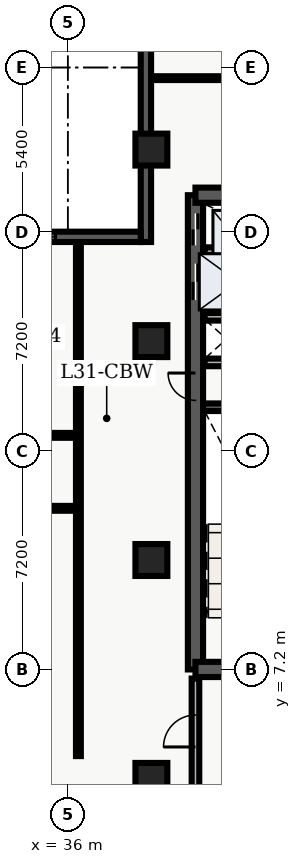
"""IFC4 building model, lengths in metres.
Left out: names, types, materials, properties, quantities, classifications, styles, units other than length and angle.
Written with IfcOpenShell. Run it as: python <this file> out.ifc"""

import sys

from ifc_helpers import new_model, entity, si_unit, converted_unit, direction, frame, origin_with_axes, origin_2d_with_axis, place, context, subcontext, project, spatial, polyline, rectangle, outline, extrude, element, fill, save


model = new_model("IFC4")
c1 = context("Model", 3, precision=1e-05, world=origin_with_axes(), true_north=direction((0.0, 1.0)))
c2 = subcontext(c1, "Body", "Model", "MODEL_VIEW")
j1 = project(units=[si_unit("LENGTHUNIT", "METRE"), converted_unit("PLANEANGLEUNIT", "DEGREE", entity("IfcPlaneAngleMeasure", 0.017), si_unit("PLANEANGLEUNIT", "RADIAN"), dimensions=[0, 0, 0, 0, 0, 0, 0])], contexts=[c1])
p1 = place(None, origin_with_axes())
s1 = spatial("IfcSite", under=j1, at=p1, CompositionType="ELEMENT")
p2 = place(p1, origin_with_axes())
s2 = spatial("IfcBuilding", under=s1, at=p2, CompositionType="ELEMENT")
p3 = place(p2, frame((0.0, 0.0, 129.0), z_axis=(0.0, 0.0, 1.0), x_axis=(1.0, 0.0, 0.0)))
s3 = spatial("IfcBuildingStorey", under=s2, at=p3, CompositionType="ELEMENT", Elevation=129.0)
p4 = place(p3, frame((40.2, 7.2, 0.0), z_axis=(0.0, 0.0, 1.0), x_axis=(0.0, 1.0, 0.0)))
e1 = element("IfcWall", 1, at=p4, inside=s3, PredefinedType="SHEAR", context=c2, shape_type="SweptSolid", body=[
    extrude(outline(polyline([(0.0, -0.25), (15.6, -0.25), (15.6, 0.25), (0.0, 0.25), (0.0, -0.25)])), origin_with_axes(), (0.0, 0.0, 1.0), 3.66),
])
p5 = place(p4, frame((14.475, 0.0, 0.0), z_axis=(0.0, 0.0, 1.0), x_axis=(1.0, 0.0, 0.0)))
e2 = element("IfcOpeningElement", 2, at=p5, cuts=e1, PredefinedType="OPENING", context=c2, shape_type="SweptSolid", body=[
    extrude(rectangle(XDim=1.05, YDim=0.52, at=origin_2d_with_axis()), origin_with_axes(), (0.0, 0.0, 1.0), 2.15),
])
p6 = place(p4, frame((12.75, 0.0, 0.0), z_axis=(0.0, 0.0, 1.0), x_axis=(1.0, 0.0, 0.0)))
e3 = element("IfcOpeningElement", 3, at=p6, cuts=e1, PredefinedType="OPENING", context=c2, shape_type="SweptSolid", body=[
    extrude(rectangle(XDim=1.2, YDim=0.52, at=origin_2d_with_axis()), origin_with_axes(), (0.0, 0.0, 1.0), 2.15),
])
p7 = place(p4, frame((9.3, 0.0, 0.0), z_axis=(0.0, 0.0, 1.0), x_axis=(1.0, 0.0, 0.0)))
e4 = element("IfcOpeningElement", 4, at=p7, cuts=e1, PredefinedType="OPENING", context=c2, shape_type="SweptSolid", body=[
    extrude(rectangle(XDim=0.9, YDim=0.52, at=origin_2d_with_axis()), origin_with_axes(), (0.0, 0.0, 1.0), 2.15),
])
p8 = place(p3, frame((40.2, 7.2, 0.0), z_axis=(0.0, 0.0, 1.0), x_axis=(1.0, 0.0, 0.0)))
e5 = element("IfcWall", 5, at=p8, inside=s3, PredefinedType="SHEAR", context=c2, shape_type="SweptSolid", body=[
    extrude(outline(polyline([(0.0, -0.25), (7.85, -0.25), (7.85, 0.25), (0.0, 0.25), (0.0, -0.25)])), origin_with_axes(), (0.0, 0.0, 1.0), 3.66),
])
p9 = place(p8, frame((2.175, 0.0, 0.0), z_axis=(0.0, 0.0, 1.0), x_axis=(1.0, 0.0, 0.0)))
e6 = element("IfcOpeningElement", 6, at=p9, cuts=e5, PredefinedType="OPENING", context=c2, shape_type="SweptSolid", body=[
    extrude(rectangle(XDim=1.05, YDim=0.52, at=origin_2d_with_axis()), origin_with_axes(), (0.0, 0.0, 1.0), 2.15),
])
p10 = place(p3, frame((40.2, 22.8, 0.0), z_axis=(0.0, 0.0, 1.0), x_axis=(1.0, 0.0, 0.0)))
e7 = element("IfcWall", 7, at=p10, inside=s3, PredefinedType="SHEAR", context=c2, shape_type="SweptSolid", body=[
    extrude(outline(polyline([(0.0, -0.25), (7.85, -0.25), (7.85, 0.25), (0.0, 0.25), (0.0, -0.25)])), origin_with_axes(), (0.0, 0.0, 1.0), 3.66),
])
p11 = place(p10, frame((5.775, 0.0, 0.0), z_axis=(0.0, 0.0, 1.0), x_axis=(1.0, 0.0, 0.0)))
e8 = element("IfcOpeningElement", 8, at=p11, cuts=e7, PredefinedType="OPENING", context=c2, shape_type="SweptSolid", body=[
    extrude(rectangle(XDim=1.05, YDim=0.52, at=origin_2d_with_axis()), origin_with_axes(), (0.0, 0.0, 1.0), 2.15),
])
p12 = place(p3, frame((40.45, 15.825, 0.0), z_axis=(0.0, 0.0, 1.0), x_axis=(1.0, 0.0, 0.0)))
e9 = element("IfcWall", 9, at=p12, inside=s3, PredefinedType="SHEAR", context=c2, shape_type="SweptSolid", body=[
    extrude(outline(polyline([(0.0, -0.125), (3.55, -0.125), (3.55, 0.125), (0.0, 0.125), (0.0, -0.125)])), origin_with_axes(), (0.0, 0.0, 1.0), 3.66),
])
p13 = place(p3, frame((40.5, 17.3, 0.0), z_axis=(0.0, 0.0, 1.0), x_axis=(1.0, 0.0, 0.0)))
e10 = element("IfcWall", 10, at=p13, inside=s3, PredefinedType="SOLIDWALL", context=c2, shape_type="SweptSolid", body=[
    extrude(outline(polyline([(0.0, -0.125), (3.5, -0.125), (3.5, 0.125), (0.0, 0.125), (0.0, -0.125)])), origin_with_axes(), (0.0, 0.0, 1.0), 2.7),
])
p14 = place(p13, frame((2.4, 0.0, 0.0), z_axis=(0.0, 0.0, 1.0), x_axis=(1.0, 0.0, 0.0)))
e11 = element("IfcOpeningElement", 11, at=p14, cuts=e10, PredefinedType="OPENING", context=c2, shape_type="SweptSolid", body=[
    extrude(rectangle(XDim=0.9, YDim=0.27, at=origin_2d_with_axis()), origin_with_axes(), (0.0, 0.0, 1.0), 2.15),
])
p15 = place(p3, frame((40.5, 18.8, 0.0), z_axis=(0.0, 0.0, 1.0), x_axis=(1.0, 0.0, 0.0)))
e12 = element("IfcWall", 12, at=p15, inside=s3, PredefinedType="SOLIDWALL", context=c2, shape_type="SweptSolid", body=[
    extrude(outline(polyline([(0.0, -0.125), (3.5, -0.125), (3.5, 0.125), (0.0, 0.125), (0.0, -0.125)])), origin_with_axes(), (0.0, 0.0, 1.0), 2.7),
])
p16 = place(p3, frame((40.2, 3.1, 0.0), z_axis=(0.0, 0.0, 1.0), x_axis=(0.0, 1.0, 0.0)))
e13 = element("IfcWall", 13, at=p16, inside=s3, PredefinedType="SOLIDWALL", context=c2, shape_type="SweptSolid", body=[
    extrude(outline(polyline([(0.0, -0.125), (3.8, -0.125), (3.8, 0.125), (0.0, 0.125), (0.0, -0.125)])), origin_with_axes(), (0.0, 0.0, 1.0), 2.7),
])
p17 = place(p16, frame((2.075, 0.0, 0.0), z_axis=(0.0, 0.0, 1.0), x_axis=(1.0, 0.0, 0.0)))
e14 = element("IfcOpeningElement", 14, at=p17, cuts=e13, PredefinedType="OPENING", context=c2, shape_type="SweptSolid", body=[
    extrude(rectangle(XDim=1.05, YDim=0.27, at=origin_2d_with_axis()), origin_with_axes(), (0.0, 0.0, 1.0), 2.15),
])
for number, where, z_axis, x_axis in (
    (15, (38.75, 3.6, 0.0), (0.0, 0.0, 1.0), (1.0, 0.0, 0.0)),
    (16, (38.75, 10.8, 0.0), (0.0, 0.0, 1.0), (1.0, 0.0, 0.0)),
    (17, (38.75, 18.0, 0.0), (0.0, 0.0, 1.0), (1.0, 0.0, 0.0)),
    (18, (38.75, 24.3, 0.0), (0.0, 0.0, 1.0), (1.0, 0.0, 0.0)),
):
    element("IfcColumn", number, at=place(p3, frame(where, z_axis=z_axis, x_axis=x_axis)), inside=s3, PredefinedType="COLUMN", context=c2, shape_type="SweptSolid", body=[
        extrude(rectangle(XDim=1.05, YDim=1.05, at=origin_2d_with_axis()), origin_with_axes(), (0.0, 0.0, 1.0), 3.9),
    ])
p18 = place(p3, frame((40.5, 20.96, 0.0), z_axis=(0.0, 0.0, 1.0), x_axis=(1.0, 0.0, 0.0)))
e19 = element("IfcWall", 19, at=p18, inside=s3, PredefinedType="SOLIDWALL", context=c2, shape_type="SweptSolid", body=[
    extrude(outline(polyline([(0.0, -0.125), (3.5, -0.125), (3.5, 0.125), (0.0, 0.125), (0.0, -0.125)])), origin_with_axes(), (0.0, 0.0, 1.0), 2.7),
])
p19 = place(p3, frame((21.15, 12.5, 0.0), z_axis=(0.0, 0.0, 1.0), x_axis=(1.0, 0.0, 0.0)))
e20 = element("IfcWall", 20, at=p19, inside=s3, PredefinedType="PARTITIONING", context=c2, shape_type="SweptSolid", body=[
    extrude(outline(polyline([(0.0, -0.08), (15.2, -0.08), (15.2, 0.08), (0.0, 0.08), (0.0, -0.08)])), origin_with_axes(), (0.0, 0.0, 1.0), 2.7),
])
p20 = place(p19, frame((2.283, 0.0, 0.0), z_axis=(0.0, 0.0, 1.0), x_axis=(1.0, 0.0, 0.0)))
e21 = element("IfcOpeningElement", 21, at=p20, cuts=e20, PredefinedType="OPENING", context=c2, shape_type="SweptSolid", body=[
    extrude(rectangle(XDim=1.0, YDim=0.18, at=origin_2d_with_axis()), origin_with_axes(), (0.0, 0.0, 1.0), 2.15),
])
p21 = place(p19, frame((6.801, 0.0, 0.0), z_axis=(0.0, 0.0, 1.0), x_axis=(1.0, 0.0, 0.0)))
e22 = element("IfcOpeningElement", 22, at=p21, cuts=e20, PredefinedType="OPENING", context=c2, shape_type="SweptSolid", body=[
    extrude(rectangle(XDim=1.0, YDim=0.18, at=origin_2d_with_axis()), origin_with_axes(), (0.0, 0.0, 1.0), 2.15),
])
p22 = place(p19, frame((12.168, 0.0, 0.0), z_axis=(0.0, 0.0, 1.0), x_axis=(1.0, 0.0, 0.0)))
e23 = element("IfcOpeningElement", 23, at=p22, cuts=e20, PredefinedType="OPENING", context=c2, shape_type="SweptSolid", body=[
    extrude(rectangle(XDim=1.0, YDim=0.18, at=origin_2d_with_axis()), origin_with_axes(), (0.0, 0.0, 1.0), 2.15),
])
p23 = place(p3, frame((21.15, 14.9, 0.0), z_axis=(0.0, 0.0, 1.0), x_axis=(1.0, 0.0, 0.0)))
e24 = element("IfcWall", 24, at=p23, inside=s3, PredefinedType="PARTITIONING", context=c2, shape_type="SweptSolid", body=[
    extrude(outline(polyline([(0.0, -0.08), (15.2, -0.08), (15.2, 0.08), (0.0, 0.08), (0.0, -0.08)])), origin_with_axes(), (0.0, 0.0, 1.0), 2.7),
])
p24 = place(p23, frame((2.564, 0.0, 0.0), z_axis=(0.0, 0.0, 1.0), x_axis=(1.0, 0.0, 0.0)))
e25 = element("IfcOpeningElement", 25, at=p24, cuts=e24, PredefinedType="OPENING", context=c2, shape_type="SweptSolid", body=[
    extrude(rectangle(XDim=1.0, YDim=0.18, at=origin_2d_with_axis()), origin_with_axes(), (0.0, 0.0, 1.0), 2.15),
])
p25 = place(p23, frame((6.465, 0.0, 0.0), z_axis=(0.0, 0.0, 1.0), x_axis=(1.0, 0.0, 0.0)))
e26 = element("IfcOpeningElement", 26, at=p25, cuts=e24, PredefinedType="OPENING", context=c2, shape_type="SweptSolid", body=[
    extrude(rectangle(XDim=1.0, YDim=0.18, at=origin_2d_with_axis()), origin_with_axes(), (0.0, 0.0, 1.0), 2.15),
])
p26 = place(p23, frame((9.65, 0.0, 0.0), z_axis=(0.0, 0.0, 1.0), x_axis=(1.0, 0.0, 0.0)))
e27 = element("IfcOpeningElement", 27, at=p26, cuts=e24, PredefinedType="OPENING", context=c2, shape_type="SweptSolid", body=[
    extrude(rectangle(XDim=1.0, YDim=0.18, at=origin_2d_with_axis()), origin_with_axes(), (0.0, 0.0, 1.0), 2.15),
])
p27 = place(p23, frame((13.219, 0.0, 0.0), z_axis=(0.0, 0.0, 1.0), x_axis=(1.0, 0.0, 0.0)))
e28 = element("IfcOpeningElement", 28, at=p27, cuts=e24, PredefinedType="OPENING", context=c2, shape_type="SweptSolid", body=[
    extrude(rectangle(XDim=1.0, YDim=0.18, at=origin_2d_with_axis()), origin_with_axes(), (0.0, 0.0, 1.0), 2.15),
])
p28 = place(p3, frame((36.35, 4.35, 0.0), z_axis=(0.0, 0.0, 1.0), x_axis=(0.0, 1.0, 0.0)))
e29 = element("IfcWall", 29, at=p28, inside=s3, PredefinedType="PARTITIONING", context=c2, shape_type="SweptSolid", body=[
    extrude(outline(polyline([(0.0, -0.08), (16.95, -0.08), (16.95, 0.08), (0.0, 0.08), (0.0, -0.08)])), origin_with_axes(), (0.0, 0.0, 1.0), 2.7),
])
p29 = place(p3, frame((38.735, 26.65, 0.0), z_axis=(0.0, 0.0, 1.0), x_axis=(1.0, 0.0, 0.0)))
e30 = element("IfcWall", 30, at=p29, inside=s3, PredefinedType="PARTITIONING", context=c2, shape_type="SweptSolid", body=[
    extrude(outline(polyline([(0.0, -0.062), (20.905, -0.062), (20.905, 0.062), (0.0, 0.062), (0.0, -0.062)])), origin_with_axes(), (0.0, 0.0, 1.0), 2.7),
])
p30 = place(p29, frame((4.265, 0.0, 0.0), z_axis=(0.0, 0.0, 1.0), x_axis=(1.0, 0.0, 0.0)))
e31 = element("IfcOpeningElement", 31, at=p30, cuts=e30, PredefinedType="OPENING", context=c2, shape_type="SweptSolid", body=[
    extrude(rectangle(XDim=1.0, YDim=0.145, at=origin_2d_with_axis()), origin_with_axes(), (0.0, 0.0, 1.0), 2.15),
])
p31 = place(p3, frame((38.57, 21.26, 0.0), z_axis=(0.0, 0.0, 1.0), x_axis=(0.0, 1.0, 0.0)))
e32 = element("IfcWall", 32, at=p31, inside=s3, PredefinedType="SOLIDWALL", context=c2, shape_type="SweptSolid", body=[
    extrude(outline(polyline([(0.0, -0.17), (7.54, -0.17), (7.54, 0.17), (0.0, 0.17), (0.0, -0.17)])), origin_with_axes(), (0.0, 0.0, 1.0), 3.66),
])
p32 = place(p3, frame((21.288, 21.43, 0.0), z_axis=(0.0, 0.0, 1.0), x_axis=(1.0, 0.0, 0.0)))
e33 = element("IfcWall", 33, at=p32, inside=s3, PredefinedType="SOLIDWALL", context=c2, shape_type="SweptSolid", body=[
    extrude(outline(polyline([(0.0, -0.17), (17.112, -0.17), (17.112, 0.17), (0.0, 0.17), (0.0, -0.17)])), origin_with_axes(), (0.0, 0.0, 1.0), 3.66),
])
p33 = place(p32, frame((3.252, 0.0, 0.45), z_axis=(0.0, 0.0, 1.0), x_axis=(1.0, 0.0, 0.0)))
e34 = element("IfcOpeningElement", 34, at=p33, cuts=e33, PredefinedType="OPENING", context=c2, shape_type="SweptSolid", body=[
    extrude(rectangle(XDim=1.8, YDim=0.36, at=origin_2d_with_axis()), origin_with_axes(), (0.0, 0.0, 1.0), 2.1),
])
p34 = place(p32, frame((9.406, 0.0, 0.45), z_axis=(0.0, 0.0, 1.0), x_axis=(1.0, 0.0, 0.0)))
e35 = element("IfcOpeningElement", 35, at=p34, cuts=e33, PredefinedType="OPENING", context=c2, shape_type="SweptSolid", body=[
    extrude(rectangle(XDim=1.8, YDim=0.36, at=origin_2d_with_axis()), origin_with_axes(), (0.0, 0.0, 1.0), 2.1),
])
p35 = place(p32, frame((13.41, 0.0, 0.45), z_axis=(0.0, 0.0, 1.0), x_axis=(1.0, 0.0, 0.0)))
e36 = element("IfcOpeningElement", 36, at=p35, cuts=e33, PredefinedType="OPENING", context=c2, shape_type="SweptSolid", body=[
    extrude(rectangle(XDim=1.8, YDim=0.36, at=origin_2d_with_axis()), origin_with_axes(), (0.0, 0.0, 1.0), 2.1),
])
p36 = place(p4, frame((14.475, 0.0, 0.0), z_axis=(0.0, 0.0, 1.0), x_axis=(1.0, 0.0, 0.0)))
e37 = element("IfcDoor", 37, at=p36, inside=s3, OperationType="SLIDING_TO_RIGHT", PredefinedType="DOOR", context=c2, shape_type="SweptSolid", body=[
    extrude(rectangle(XDim=1.05, YDim=0.09, at=origin_2d_with_axis()), origin_with_axes(), (0.0, 0.0, 1.0), 2.15),
])
fill(e2, e37)
p37 = place(p4, frame((12.75, 0.0, 0.0), z_axis=(0.0, 0.0, 1.0), x_axis=(1.0, 0.0, 0.0)))
e38 = element("IfcDoor", 38, at=p37, inside=s3, OperationType="DOUBLE_DOOR_SLIDING", PredefinedType="DOOR", context=c2, shape_type="SweptSolid", body=[
    extrude(rectangle(XDim=1.2, YDim=0.09, at=origin_2d_with_axis()), origin_with_axes(), (0.0, 0.0, 1.0), 2.15),
])
fill(e3, e38)
p38 = place(p4, frame((9.3, 0.0, 0.0), z_axis=(0.0, 0.0, 1.0), x_axis=(1.0, 0.0, 0.0)))
e39 = element("IfcDoor", 39, at=p38, inside=s3, OperationType="SINGLE_SWING_RIGHT", PredefinedType="DOOR", context=c2, shape_type="SweptSolid", body=[
    extrude(rectangle(XDim=0.9, YDim=0.09, at=origin_2d_with_axis()), origin_with_axes(), (0.0, 0.0, 1.0), 2.15),
])
fill(e4, e39)
p39 = place(p16, frame((2.075, 0.0, 0.0), z_axis=(0.0, 0.0, 1.0), x_axis=(1.0, 0.0, 0.0)))
e40 = element("IfcDoor", 40, at=p39, inside=s3, OperationType="SINGLE_SWING_LEFT", PredefinedType="DOOR", context=c2, shape_type="SweptSolid", body=[
    extrude(rectangle(XDim=1.05, YDim=0.09, at=origin_2d_with_axis()), origin_with_axes(), (0.0, 0.0, 1.0), 2.15),
])
fill(e14, e40)
p40 = place(p32, frame((13.41, 0.0, 0.45), z_axis=(0.0, 0.0, 1.0), x_axis=(1.0, 0.0, 0.0)))
e41 = element("IfcWindow", 41, at=p40, inside=s3, PredefinedType="WINDOW", context=c2, shape_type="SweptSolid", body=[
    extrude(rectangle(XDim=1.8, YDim=0.09, at=origin_2d_with_axis()), origin_with_axes(), (0.0, 0.0, 1.0), 2.1),
])
fill(e36, e41)
save(model, sys.argv[1])
